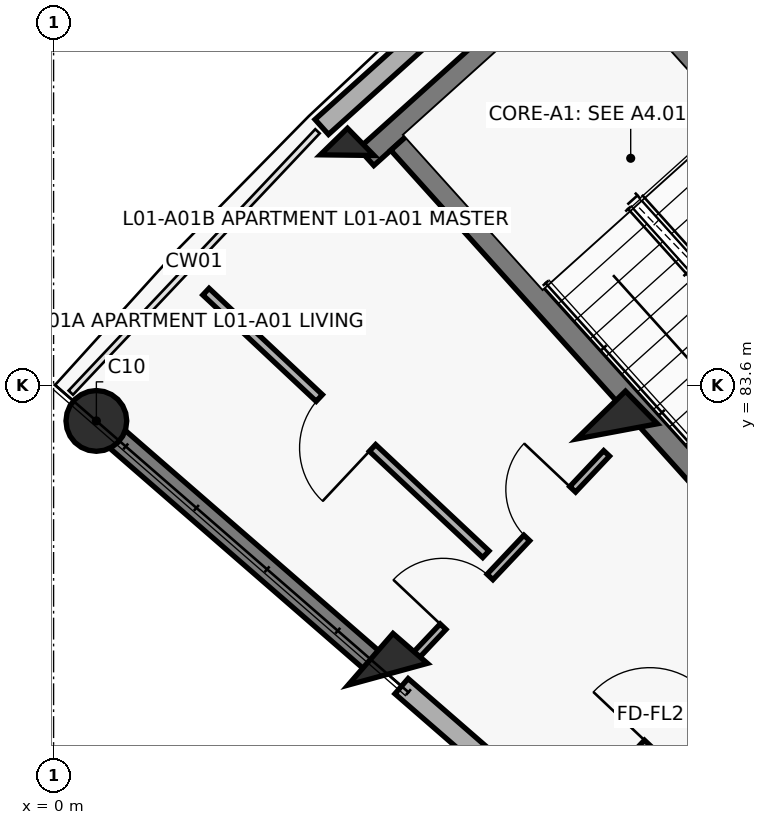
"""IFC4 building model, lengths in metres.
Left out: names, types, materials, properties, quantities, classifications, styles, units other than length and angle.
Written with IfcOpenShell. Run it as: python <this file> out.ifc"""

import sys

from ifc_helpers import new_model, si_unit, direction, frame, frame_2d, origin, origin_2d, place, context, subcontext, project, spatial, rectangle, circle, extrude, element, fill, save


model = new_model("IFC4")
c1 = context("Model", 3, precision=1e-05, world=origin(), true_north=direction((0.0, 1.0)))
c2 = subcontext(c1, "Body", "Model", "MODEL_VIEW")
j1 = project(units=[si_unit("LENGTHUNIT", "METRE"), si_unit("PLANEANGLEUNIT", "RADIAN")], contexts=[c1])
p1 = place(None, origin())
s1 = spatial("IfcSite", under=j1, at=p1, CompositionType="ELEMENT")
p2 = place(p1, origin())
s2 = spatial("IfcBuilding", under=s1, at=p2, CompositionType="ELEMENT")
p3 = place(p2, frame((0.0, 0.0, 4.5)))
s3 = spatial("IfcBuildingStorey", under=s2, at=p3, CompositionType="ELEMENT", Elevation=4.5)
p4 = place(p3, frame((4.397, 79.796, 0.0), z_axis=(0.0, 0.0, 1.0), x_axis=(-0.754709580223, 0.656059028991, 0.0)))
e1 = element("IfcColumn", 1, at=p4, inside=s3, PredefinedType="COLUMN", context=c2, shape_type="SweptSolid", body=[
    extrude(rectangle(XDim=0.6, YDim=0.9, at=origin_2d()), origin(), (0.0, 0.0, 1.0), 3.6),
])
p5 = place(p3, frame((0.563, 83.129, 0.0), z_axis=(0.0, 0.0, 1.0), x_axis=(-0.754709580223, 0.656059028991, 0.0)))
e2 = element("IfcColumn", 2, at=p5, inside=s3, PredefinedType="COLUMN", context=c2, shape_type="SweptSolid", body=[
    extrude(circle(Radius=0.4, at=origin_2d()), origin(), (0.0, 0.0, 1.0), 3.6),
])
p6 = place(p3, frame((7.412, 82.991, 0.0), z_axis=(0.0, 0.0, 1.0), x_axis=(-0.698665066769, 0.715448897181, 0.0)))
e3 = element("IfcColumn", 3, at=p6, inside=s3, PredefinedType="COLUMN", context=c2, shape_type="SweptSolid", body=[
    extrude(rectangle(XDim=0.6, YDim=0.9, at=origin_2d()), origin(), (0.0, 0.0, 1.0), 3.6),
])
p7 = place(p3, frame((3.863, 86.626, 0.0), z_axis=(0.0, 0.0, 1.0), x_axis=(-0.698665066769, 0.715448897181, 0.0)))
e4 = element("IfcColumn", 4, at=p7, inside=s3, PredefinedType="COLUMN", context=c2, shape_type="SweptSolid", body=[
    extrude(rectangle(XDim=0.5, YDim=0.5, at=origin_2d()), origin(), (0.0, 0.0, 1.0), 3.6),
])
p8 = place(p3, frame((4.261, 79.914, 0.0), z_axis=(0.0, 0.0, 1.0), x_axis=(-0.754703505217, 0.65606601742, 0.0)))
e5 = element("IfcWall", 5, at=p8, inside=s3, PredefinedType="SHEAR", context=c2, shape_type="SweptSolid", body=[
    extrude(rectangle(XDim=4.72, YDim=0.31, at=frame_2d((2.36, 0.0))), origin(), (0.0, 0.0, 1.0), 3.36),
])
p9 = place(p3, frame((3.528, 86.997, 0.0), z_axis=(0.0, 0.0, 1.0), x_axis=(0.743387539862, 0.668860946369, 0.0)))
e6 = element("IfcWall", 6, at=p9, inside=s3, PredefinedType="SOLIDWALL", context=c2, shape_type="SweptSolid", body=[
    extrude(rectangle(XDim=4.809, YDim=0.265, at=frame_2d((2.405, 0.0))), origin(), (0.0, 0.0, 1.0), 2.6),
])
p10 = place(p3, frame((10.766, 74.259, 0.0), z_axis=(0.0, 0.0, 1.0), x_axis=(-0.754717680958, 0.656049710044, 0.0)))
e7 = element("IfcWall", 7, at=p10, inside=s3, PredefinedType="SOLIDWALL", context=c2, shape_type="SweptSolid", body=[
    extrude(rectangle(XDim=8.2, YDim=0.265, at=frame_2d((4.1, 0.0))), origin(), (0.0, 0.0, 1.0), 2.58),
])
p11 = place(p10, frame((3.59, 0.0, 0.75)))
e8 = element("IfcOpeningElement", 8, at=p11, cuts=e7, PredefinedType="OPENING", context=c2, shape_type="SweptSolid", body=[
    extrude(rectangle(XDim=1.35, YDim=1.35, at=frame_2d((0.675, 0.675))), frame((0.0, 0.142, 0.0), z_axis=(0.0, -1.0, 0.0), x_axis=(1.0, 0.0, 0.0)), (0.0, 0.0, 1.0), 0.285),
])
p12 = place(p3, frame((7.436, 89.59, 0.0), z_axis=(0.0, 0.0, 1.0), x_axis=(-0.743400052815, -0.668847038922, 0.0)))
e9 = element("IfcWall", 9, at=p12, inside=s3, PredefinedType="SHEAR", context=c2, shape_type="SweptSolid", body=[
    extrude(rectangle(XDim=4.47, YDim=0.3, at=frame_2d((2.235, 0.0))), origin(), (0.0, 0.0, 1.0), 3.6),
])
p13 = place(p3, frame((12.345, 83.461, 0.0), z_axis=(0.0, 0.0, 1.0), x_axis=(-0.668868253964, 0.743380964808, 0.0)))
e10 = element("IfcWall", 10, at=p13, inside=s3, PredefinedType="SHEAR", context=c2, shape_type="SweptSolid", body=[
    extrude(rectangle(XDim=7.69, YDim=0.3, at=frame_2d((3.845, 0.0))), origin(), (0.0, 0.0, 1.0), 3.6),
])
p14 = place(p3, frame((9.691, 81.073, 0.0), z_axis=(0.0, 0.0, 1.0), x_axis=(-0.668885797871, 0.743365179038, 0.0)))
e11 = element("IfcWall", 11, at=p14, inside=s3, PredefinedType="SHEAR", context=c2, shape_type="SweptSolid", body=[
    extrude(rectangle(XDim=7.69, YDim=0.3, at=frame_2d((3.845, 0.0))), origin(), (0.0, 0.0, 1.0), 3.6),
])
p15 = place(p3, frame((7.014, 77.984, 0.0), z_axis=(0.0, 0.0, 1.0), x_axis=(0.686310507227, 0.727308660522, 0.0)))
e12 = element("IfcWall", 12, at=p15, inside=s3, PredefinedType="SOLIDWALL", context=c2, shape_type="SweptSolid", body=[
    extrude(rectangle(XDim=3.436, YDim=0.19, at=frame_2d((1.718, 0.0))), origin(), (0.0, 0.0, 1.0), 2.58),
])
p16 = place(p15, frame((1.208, 0.0, 0.0)))
e13 = element("IfcOpeningElement", 13, at=p16, cuts=e12, PredefinedType="OPENING", context=c2, shape_type="SweptSolid", body=[
    extrude(rectangle(XDim=1.02, YDim=2.15, at=frame_2d((0.51, 1.075))), frame((0.0, 0.105, 0.0), z_axis=(0.0, -1.0, 0.0), x_axis=(1.0, 0.0, 0.0)), (0.0, 0.0, 1.0), 0.21),
])
p17 = place(p3, frame((4.678, 79.948, 0.0), z_axis=(0.0, 0.0, 1.0), x_axis=(0.686331812627, 0.72728855551, 0.0)))
e14 = element("IfcWall", 14, at=p17, inside=s3, PredefinedType="PARTITIONING", context=c2, shape_type="SweptSolid", body=[
    extrude(rectangle(XDim=3.785, YDim=0.105, at=frame_2d((1.893, 0.0))), origin(), (0.0, 0.0, 1.0), 2.58),
])
p18 = place(p17, frame((0.65, 0.0, 0.0)))
e15 = element("IfcOpeningElement", 15, at=p18, cuts=e14, PredefinedType="OPENING", context=c2, shape_type="SweptSolid", body=[
    extrude(rectangle(XDim=0.9, YDim=2.1, at=frame_2d((0.45, 1.05))), frame((0.0, 0.062, 0.0), z_axis=(0.0, -1.0, 0.0), x_axis=(1.0, 0.0, 0.0)), (0.0, 0.0, 1.0), 0.125),
])
p19 = place(p17, frame((2.255, 0.0, 0.0)))
e16 = element("IfcOpeningElement", 16, at=p19, cuts=e14, PredefinedType="OPENING", context=c2, shape_type="SweptSolid", body=[
    extrude(rectangle(XDim=0.88, YDim=2.1, at=frame_2d((0.44, 1.05))), frame((0.0, 0.062, 0.0), z_axis=(0.0, -1.0, 0.0), x_axis=(1.0, 0.0, 0.0)), (0.0, 0.0, 1.0), 0.125),
])
p20 = place(p3, frame((5.688, 81.375, 0.0), z_axis=(0.0, 0.0, 1.0), x_axis=(-0.72936983679, 0.684119610288, 0.0)))
e17 = element("IfcWall", 17, at=p20, inside=s3, PredefinedType="PARTITIONING", context=c2, shape_type="SweptSolid", body=[
    extrude(rectangle(XDim=5.05, YDim=0.12, at=frame_2d((2.525, 0.0))), origin(), (0.0, 0.0, 1.0), 2.58),
])
p21 = place(p20, frame((2.045, 0.0, 0.0)))
e18 = element("IfcOpeningElement", 18, at=p21, cuts=e17, PredefinedType="OPENING", context=c2, shape_type="SweptSolid", body=[
    extrude(rectangle(XDim=0.96, YDim=2.1, at=frame_2d((0.48, 1.05))), frame((0.0, 0.07, 0.0), z_axis=(0.0, -1.0, 0.0), x_axis=(1.0, 0.0, 0.0)), (0.0, 0.0, 1.0), 0.14),
])
p22 = place(p16, origin())
e19 = element("IfcDoor", 19, at=p22, inside=s3, OperationType="SINGLE_SWING_LEFT", PredefinedType="DOOR", context=c2, shape_type="SweptSolid", body=[
    extrude(rectangle(XDim=1.02, YDim=2.15, at=frame_2d((0.51, 1.075))), frame((0.0, 0.025, 0.0), z_axis=(0.0, -1.0, 0.0), x_axis=(1.0, 0.0, 0.0)), (0.0, 0.0, 1.0), 0.05),
])
fill(e13, e19)
p23 = place(p18, origin())
e20 = element("IfcDoor", 20, at=p23, inside=s3, OperationType="SINGLE_SWING_LEFT", PredefinedType="DOOR", context=c2, shape_type="SweptSolid", body=[
    extrude(rectangle(XDim=0.9, YDim=2.1, at=frame_2d((0.45, 1.05))), frame((0.0, 0.025, 0.0), z_axis=(0.0, -1.0, 0.0), x_axis=(1.0, 0.0, 0.0)), (0.0, 0.0, 1.0), 0.05),
])
fill(e15, e20)
p24 = place(p19, origin())
e21 = element("IfcDoor", 21, at=p24, inside=s3, OperationType="SINGLE_SWING_RIGHT", PredefinedType="DOOR", context=c2, shape_type="SweptSolid", body=[
    extrude(rectangle(XDim=0.88, YDim=2.1, at=frame_2d((0.44, 1.05))), frame((0.0, 0.025, 0.0), z_axis=(0.0, -1.0, 0.0), x_axis=(1.0, 0.0, 0.0)), (0.0, 0.0, 1.0), 0.05),
])
fill(e16, e21)
p25 = place(p21, origin())
e22 = element("IfcDoor", 22, at=p25, inside=s3, OperationType="SINGLE_SWING_LEFT", PredefinedType="DOOR", context=c2, shape_type="SweptSolid", body=[
    extrude(rectangle(XDim=0.96, YDim=2.1, at=frame_2d((0.48, 1.05))), frame((0.0, 0.025, 0.0), z_axis=(0.0, -1.0, 0.0), x_axis=(1.0, 0.0, 0.0)), (0.0, 0.0, 1.0), 0.05),
])
fill(e18, e22)
save(model, sys.argv[1])
